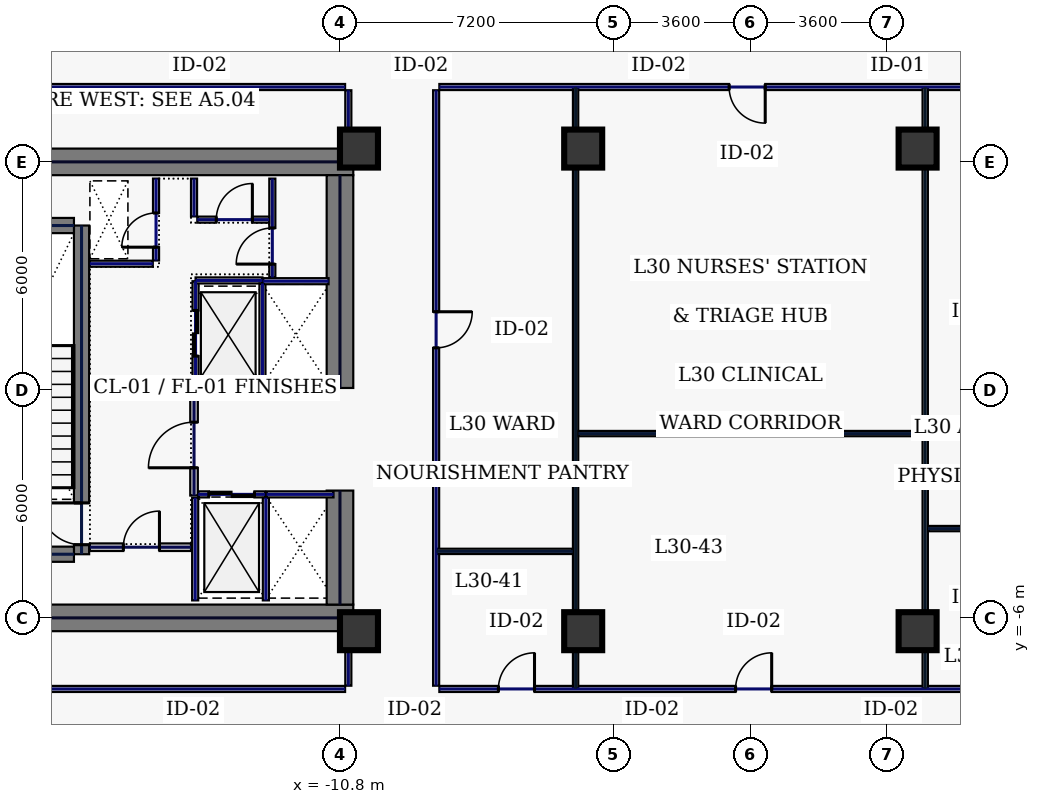
"""IFC4 building model, lengths in metres.
Left out: names, types, materials, properties, quantities, classifications, styles, units other than length and angle.
Written with IfcOpenShell. Run it as: python <this file> out.ifc"""

import sys

from ifc_helpers import new_model, si_unit, direction, frame, frame_2d, origin, origin_2d, place, context, subcontext, project, spatial, rectangle, hollow_rectangle, extrude, element, fill, save


model = new_model("IFC4")
c1 = context("Model", 3, precision=1e-05, world=origin(), true_north=direction((0.0, 1.0)))
c2 = subcontext(c1, "Body", "Model", "MODEL_VIEW")
j1 = project(units=[si_unit("LENGTHUNIT", "METRE"), si_unit("PLANEANGLEUNIT", "RADIAN")], contexts=[c1])
p1 = place(None, origin())
s1 = spatial("IfcSite", under=j1, at=p1, CompositionType="ELEMENT")
p2 = place(p1, origin())
s2 = spatial("IfcBuilding", under=s1, at=p2, CompositionType="ELEMENT")
p3 = place(p2, frame((0.0, 0.0, 133.4)))
s3 = spatial("IfcBuildingStorey", under=s2, at=p3, CompositionType="ELEMENT", Elevation=133.4)
for number, where, z_axis, x_axis in (
    (1, (-22.0, 6.0, 0.0), (0.0, 0.0, 1.0), (1.0, 0.0, 0.0)),
    (2, (-22.0, -6.0, 0.0), (0.0, 0.0, 1.0), (1.0, 0.0, 0.0)),
):
    element("IfcWall", number, at=place(p3, frame(where, z_axis=z_axis, x_axis=x_axis)), inside=s3, PredefinedType="SHEAR", context=c2, shape_type="SweptSolid", body=[
        extrude(rectangle(XDim=11.55, YDim=0.7, at=frame_2d((5.775, 0.0))), origin(), (0.0, 0.0, 1.0), 3.74),
    ])
p4 = place(p3, frame((-10.8, -5.65, 0.0), z_axis=(0.0, 0.0, 1.0), x_axis=(0.0, 1.0, 0.0)))
e3 = element("IfcWall", 3, at=p4, inside=s3, PredefinedType="SHEAR", context=c2, shape_type="SweptSolid", body=[
    extrude(rectangle(XDim=3.0, YDim=0.7, at=frame_2d((1.5, 0.0))), origin(), (0.0, 0.0, 1.0), 3.74),
])
p5 = place(p3, frame((-10.8, 0.05, 0.0), z_axis=(0.0, 0.0, 1.0), x_axis=(0.0, 1.0, 0.0)))
e4 = element("IfcWall", 4, at=p5, inside=s3, PredefinedType="SHEAR", context=c2, shape_type="SweptSolid", body=[
    extrude(rectangle(XDim=5.6, YDim=0.7, at=frame_2d((2.8, 0.0))), origin(), (0.0, 0.0, 1.0), 3.74),
])
p6 = place(p3, frame((-17.6, -4.325, 0.0), z_axis=(0.0, 0.0, 1.0), x_axis=(0.0, 1.0, 0.0)))
e5 = element("IfcWall", 5, at=p6, inside=s3, PredefinedType="SHEAR", context=c2, shape_type="SweptSolid", body=[
    extrude(rectangle(XDim=8.65, YDim=0.4, at=frame_2d((4.325, 0.0))), origin(), (0.0, 0.0, 1.0), 3.74),
])
p7 = place(p6, frame((0.25, 0.0, 0.0)))
e6 = element("IfcOpeningElement", 6, at=p7, cuts=e5, PredefinedType="OPENING", context=c2, shape_type="SweptSolid", body=[
    extrude(rectangle(XDim=1.1, YDim=2.2, at=frame_2d((0.55, 1.1))), frame((0.0, 0.21, 0.0), z_axis=(0.0, -1.0, 0.0), x_axis=(1.0, 0.0, 0.0)), (0.0, 0.0, 1.0), 0.42),
])
for number, where, z_axis, x_axis in (
    (7, (-21.2, -4.325, 0.0), (0.0, 0.0, 1.0), (1.0, 0.0, 0.0)),
    (8, (-21.2, 4.325, 0.0), (0.0, 0.0, 1.0), (1.0, 0.0, 0.0)),
):
    element("IfcWall", number, at=place(p3, frame(where, z_axis=z_axis, x_axis=x_axis)), inside=s3, PredefinedType="SHEAR", context=c2, shape_type="SweptSolid", body=[
        extrude(rectangle(XDim=3.4, YDim=0.4, at=frame_2d((1.7, 0.0))), origin(), (0.0, 0.0, 1.0), 3.74),
    ])
for number, where, z_axis, x_axis in (
    (9, (-10.3, -6.35, 0.0), (0.0, 0.0, 1.0), (1.0, 0.0, 0.0)),
    (10, (-10.3, 6.35, 0.0), (0.0, 0.0, 1.0), (1.0, 0.0, 0.0)),
    (11, (-4.4, -6.35, 0.0), (0.0, 0.0, 1.0), (1.0, 0.0, 0.0)),
    (12, (4.4, -6.35, 0.0), (0.0, 0.0, 1.0), (1.0, 0.0, 0.0)),
    (13, (-4.4, 6.35, 0.0), (0.0, 0.0, 1.0), (1.0, 0.0, 0.0)),
    (14, (4.4, 6.35, 0.0), (0.0, 0.0, 1.0), (1.0, 0.0, 0.0)),
):
    element("IfcColumn", number, at=place(p3, frame(where, z_axis=z_axis, x_axis=x_axis)), inside=s3, PredefinedType="COLUMN", context=c2, shape_type="SweptSolid", body=[
        extrude(hollow_rectangle(XDim=1.0, YDim=1.0, WallThickness=0.045, at=origin_2d()), origin(), (0.0, 0.0, 1.0), 3.74),
    ])
p8 = place(p3, frame((-14.6, 0.12, 0.0), z_axis=(0.0, 0.0, 1.0), x_axis=(0.0, 1.0, 0.0)))
e15 = element("IfcWall", 15, at=p8, inside=s3, PredefinedType="PARTITIONING", context=c2, shape_type="SweptSolid", body=[
    extrude(rectangle(XDim=2.74, YDim=0.16, at=frame_2d((1.37, 0.0))), origin(), (0.0, 0.0, 1.0), 3.74),
])
p9 = place(p8, frame((0.77, 0.0, 0.0)))
e16 = element("IfcOpeningElement", 16, at=p9, cuts=e15, PredefinedType="OPENING", context=c2, shape_type="SweptSolid", body=[
    extrude(rectangle(XDim=1.2, YDim=2.2, at=frame_2d((0.6, 1.1))), frame((0.0, 0.09, 0.0), z_axis=(0.0, -1.0, 0.0), x_axis=(1.0, 0.0, 0.0)), (0.0, 0.0, 1.0), 0.18),
])
for number, where, z_axis, x_axis in (
    (17, (-14.6, 0.1, 0.0), (0.0, 0.0, 1.0), (1.0, 0.0, 0.0)),
    (18, (-14.6, 2.88, 0.0), (0.0, 0.0, 1.0), (1.0, 0.0, 0.0)),
):
    element("IfcWall", number, at=place(p3, frame(where, z_axis=z_axis, x_axis=x_axis)), inside=s3, PredefinedType="PARTITIONING", context=c2, shape_type="SweptSolid", body=[
        extrude(rectangle(XDim=1.76, YDim=0.16, at=frame_2d((0.88, 0.0))), origin(), (0.0, 0.0, 1.0), 3.74),
    ])
p10 = place(p3, frame((-12.84, 0.18, 0.0), z_axis=(0.0, 0.0, 1.0), x_axis=(0.0, 1.0, 0.0)))
e19 = element("IfcWall", 19, at=p10, inside=s3, PredefinedType="PARTITIONING", context=c2, shape_type="SweptSolid", body=[
    extrude(rectangle(XDim=2.62, YDim=0.16, at=frame_2d((1.31, 0.0))), origin(), (0.0, 0.0, 1.0), 3.74),
])
p11 = place(p3, frame((-14.53, -2.75, 0.0), z_axis=(0.0, 0.0, 1.0), x_axis=(1.0, 0.0, 0.0)))
e20 = element("IfcWall", 20, at=p11, inside=s3, PredefinedType="PARTITIONING", context=c2, shape_type="SweptSolid", body=[
    extrude(rectangle(XDim=1.76, YDim=0.16, at=frame_2d((0.88, 0.0))), origin(), (0.0, 0.0, 1.0), 3.74),
])
p12 = place(p11, frame((0.28, 0.0, 0.0)))
e21 = element("IfcOpeningElement", 21, at=p12, cuts=e20, PredefinedType="OPENING", context=c2, shape_type="SweptSolid", body=[
    extrude(rectangle(XDim=1.2, YDim=2.2, at=frame_2d((0.6, 1.1))), frame((0.0, 0.09, 0.0), z_axis=(0.0, -1.0, 0.0), x_axis=(1.0, 0.0, 0.0)), (0.0, 0.0, 1.0), 0.18),
])
for number, where, z_axis, x_axis in (
    (22, (-12.75, -5.54, 0.0), (0.0, 0.0, 1.0), (0.0, 1.0, 0.0)),
    (23, (-14.61, -5.54, 0.0), (0.0, 0.0, 1.0), (0.0, 1.0, 0.0)),
):
    element("IfcWall", number, at=place(p3, frame(where, z_axis=z_axis, x_axis=x_axis)), inside=s3, PredefinedType="PARTITIONING", context=c2, shape_type="SweptSolid", body=[
        extrude(rectangle(XDim=2.7, YDim=0.16, at=frame_2d((1.35, 0.0))), origin(), (0.0, 0.0, 1.0), 3.74),
    ])
p13 = place(p3, frame((-12.73, -2.75, 0.0), z_axis=(0.0, 0.0, 1.0), x_axis=(1.0, 0.0, 0.0)))
e24 = element("IfcWall", 24, at=p13, inside=s3, PredefinedType="PARTITIONING", context=c2, shape_type="SweptSolid", body=[
    extrude(rectangle(XDim=1.76, YDim=0.16, at=frame_2d((0.88, 0.0))), origin(), (0.0, 0.0, 1.0), 3.74),
])
for number, where, z_axis, x_axis in (
    (25, (-12.82, 0.06, 0.0), (0.0, 0.0, 1.0), (1.0, 0.0, 0.0)),
    (26, (-12.82, 2.86, 0.0), (0.0, 0.0, 1.0), (1.0, 0.0, 0.0)),
):
    element("IfcWall", number, at=place(p3, frame(where, z_axis=z_axis, x_axis=x_axis)), inside=s3, PredefinedType="PARTITIONING", context=c2, shape_type="SweptSolid", body=[
        extrude(rectangle(XDim=1.72, YDim=0.16, at=frame_2d((0.86, 0.0))), origin(), (0.0, 0.0, 1.0), 3.74),
    ])
p14 = place(p3, frame((-15.64, 3.405, 0.0), z_axis=(0.0, 0.0, 1.0), x_axis=(0.0, 1.0, 0.0)))
e27 = element("IfcWall", 27, at=p14, inside=s3, PredefinedType="PARTITIONING", context=c2, shape_type="SweptSolid", body=[
    extrude(rectangle(XDim=2.155, YDim=0.16, at=frame_2d((1.078, 0.0))), origin(), (0.0, 0.0, 1.0), 3.74),
])
p15 = place(p14, frame((0.35, 0.0, 0.0)))
e28 = element("IfcOpeningElement", 28, at=p15, cuts=e27, PredefinedType="OPENING", context=c2, shape_type="SweptSolid", body=[
    extrude(rectangle(XDim=0.9, YDim=2.2, at=frame_2d((0.45, 1.1))), frame((0.0, 0.09, 0.0), z_axis=(0.0, -1.0, 0.0), x_axis=(1.0, 0.0, 0.0)), (0.0, 0.0, 1.0), 0.18),
])
p16 = place(p3, frame((-17.38, 3.32, 0.0), z_axis=(0.0, 0.0, 1.0), x_axis=(1.0, 0.0, 0.0)))
e29 = element("IfcWall", 29, at=p16, inside=s3, PredefinedType="PARTITIONING", context=c2, shape_type="SweptSolid", body=[
    extrude(rectangle(XDim=1.655, YDim=0.16, at=frame_2d((0.827, 0.0))), origin(), (0.0, 0.0, 1.0), 3.74),
])
p17 = place(p3, frame((-17.38, -4.14, 0.0), z_axis=(0.0, 0.0, 1.0), x_axis=(1.0, 0.0, 0.0)))
e30 = element("IfcWall", 30, at=p17, inside=s3, PredefinedType="SOLIDWALL", context=c2, shape_type="SweptSolid", body=[
    extrude(rectangle(XDim=2.66, YDim=0.2, at=frame_2d((1.33, 0.0))), origin(), (0.0, 0.0, 1.0), 3.74),
])
p18 = place(p17, frame((0.88, 0.0, 0.0)))
e31 = element("IfcOpeningElement", 31, at=p18, cuts=e30, PredefinedType="OPENING", context=c2, shape_type="SweptSolid", body=[
    extrude(rectangle(XDim=0.95, YDim=2.2, at=frame_2d((0.475, 1.1))), frame((0.0, 0.11, 0.0), z_axis=(0.0, -1.0, 0.0), x_axis=(1.0, 0.0, 0.0)), (0.0, 0.0, 1.0), 0.22),
])
p19 = place(p3, frame((-12.58, 2.96, 0.0), z_axis=(0.0, 0.0, 1.0), x_axis=(0.0, 1.0, 0.0)))
e32 = element("IfcWall", 32, at=p19, inside=s3, PredefinedType="PARTITIONING", context=c2, shape_type="SweptSolid", body=[
    extrude(rectangle(XDim=2.6, YDim=0.16, at=frame_2d((1.3, 0.0))), origin(), (0.0, 0.0, 1.0), 3.74),
])
p20 = place(p19, frame((0.35, 0.0, 0.0)))
e33 = element("IfcOpeningElement", 33, at=p20, cuts=e32, PredefinedType="OPENING", context=c2, shape_type="SweptSolid", body=[
    extrude(rectangle(XDim=0.95, YDim=2.2, at=frame_2d((0.475, 1.1))), frame((0.0, 0.09, 0.0), z_axis=(0.0, -1.0, 0.0), x_axis=(1.0, 0.0, 0.0)), (0.0, 0.0, 1.0), 0.18),
])
p21 = place(p3, frame((-14.555, 4.48, 0.0), z_axis=(0.0, 0.0, 1.0), x_axis=(1.0, 0.0, 0.0)))
e34 = element("IfcWall", 34, at=p21, inside=s3, PredefinedType="PARTITIONING", context=c2, shape_type="SweptSolid", body=[
    extrude(rectangle(XDim=1.89, YDim=0.16, at=frame_2d((0.945, 0.0))), origin(), (0.0, 0.0, 1.0), 3.74),
])
p22 = place(p21, frame((0.5, 0.0, 0.0)))
e35 = element("IfcOpeningElement", 35, at=p22, cuts=e34, PredefinedType="OPENING", context=c2, shape_type="SweptSolid", body=[
    extrude(rectangle(XDim=0.95, YDim=2.2, at=frame_2d((0.475, 1.1))), frame((0.0, 0.09, 0.0), z_axis=(0.0, -1.0, 0.0), x_axis=(1.0, 0.0, 0.0)), (0.0, 0.0, 1.0), 0.18),
])
p23 = place(p3, frame((-14.64, 4.565, 0.0), z_axis=(0.0, 0.0, 1.0), x_axis=(0.0, 1.0, 0.0)))
e36 = element("IfcWall", 36, at=p23, inside=s3, PredefinedType="PARTITIONING", context=c2, shape_type="SweptSolid", body=[
    extrude(rectangle(XDim=0.995, YDim=0.16, at=frame_2d((0.498, 0.0))), origin(), (0.0, 0.0, 1.0), 3.74),
])
p24 = place(p3, frame((-14.64, -2.78, 0.0), z_axis=(0.0, 0.0, 1.0), x_axis=(0.0, 1.0, 0.0)))
e37 = element("IfcWall", 37, at=p24, inside=s3, PredefinedType="SOLIDWALL", context=c2, shape_type="SweptSolid", body=[
    extrude(rectangle(XDim=2.82, YDim=0.2, at=frame_2d((1.41, 0.0))), origin(), (0.0, 0.0, 1.0), 3.74),
])
p25 = place(p24, frame((0.73, 0.0, 0.0)))
e38 = element("IfcOpeningElement", 38, at=p25, cuts=e37, PredefinedType="OPENING", context=c2, shape_type="SweptSolid", body=[
    extrude(rectangle(XDim=1.2, YDim=2.2, at=frame_2d((0.6, 1.1))), frame((0.0, 0.11, 0.0), z_axis=(0.0, -1.0, 0.0), x_axis=(1.0, 0.0, 0.0)), (0.0, 0.0, 1.0), 0.22),
])
p26 = place(p3, frame((8.185, 7.97, 0.0), z_axis=(0.0, 0.0, 1.0), x_axis=(-1.0, 0.0, 0.0)))
e39 = element("IfcWall", 39, at=p26, inside=s3, PredefinedType="PARTITIONING", context=c2, shape_type="SweptSolid", body=[
    extrude(rectangle(XDim=16.37, YDim=0.16, at=frame_2d((8.185, 0.0))), origin(), (0.0, 0.0, 1.0), 3.74),
])
p27 = place(p26, frame((7.795, 0.0, 0.0)))
e40 = element("IfcOpeningElement", 40, at=p27, cuts=e39, PredefinedType="OPENING", context=c2, shape_type="SweptSolid", body=[
    extrude(rectangle(XDim=0.95, YDim=2.2, at=frame_2d((0.475, 1.1))), frame((0.0, 0.09, 0.0), z_axis=(0.0, -1.0, 0.0), x_axis=(1.0, 0.0, 0.0)), (0.0, 0.0, 1.0), 0.18),
])
p28 = place(p3, frame((-8.27, 7.885, 0.0), z_axis=(0.0, 0.0, 1.0), x_axis=(0.0, -1.0, 0.0)))
e41 = element("IfcWall", 41, at=p28, inside=s3, PredefinedType="PARTITIONING", context=c2, shape_type="SweptSolid", body=[
    extrude(rectangle(XDim=15.67, YDim=0.16, at=frame_2d((7.835, 0.0))), origin(), (0.0, 0.0, 1.0), 3.74),
])
p29 = place(p28, frame((5.829, 0.0, 0.0)))
e42 = element("IfcOpeningElement", 42, at=p29, cuts=e41, PredefinedType="OPENING", context=c2, shape_type="SweptSolid", body=[
    extrude(rectangle(XDim=0.95, YDim=2.2, at=frame_2d((0.475, 1.1))), frame((0.0, 0.09, 0.0), z_axis=(0.0, -1.0, 0.0), x_axis=(1.0, 0.0, 0.0)), (0.0, 0.0, 1.0), 0.18),
])
p30 = place(p3, frame((-8.185, -7.87, 0.0), z_axis=(0.0, 0.0, 1.0), x_axis=(1.0, 0.0, 0.0)))
e43 = element("IfcWall", 43, at=p30, inside=s3, PredefinedType="PARTITIONING", context=c2, shape_type="SweptSolid", body=[
    extrude(rectangle(XDim=16.37, YDim=0.16, at=frame_2d((8.185, 0.0))), origin(), (0.0, 0.0, 1.0), 3.74),
])
p31 = place(p30, frame((1.554, 0.0, 0.0)))
e44 = element("IfcOpeningElement", 44, at=p31, cuts=e43, PredefinedType="OPENING", context=c2, shape_type="SweptSolid", body=[
    extrude(rectangle(XDim=0.95, YDim=2.2, at=frame_2d((0.475, 1.1))), frame((0.0, 0.09, 0.0), z_axis=(0.0, -1.0, 0.0), x_axis=(1.0, 0.0, 0.0)), (0.0, 0.0, 1.0), 0.18),
])
p32 = place(p30, frame((7.795, 0.0, 0.0)))
e45 = element("IfcOpeningElement", 45, at=p32, cuts=e43, PredefinedType="OPENING", context=c2, shape_type="SweptSolid", body=[
    extrude(rectangle(XDim=0.95, YDim=2.2, at=frame_2d((0.475, 1.1))), frame((0.0, 0.09, 0.0), z_axis=(0.0, -1.0, 0.0), x_axis=(1.0, 0.0, 0.0)), (0.0, 0.0, 1.0), 0.18),
])
p33 = place(p3, frame((-10.58, -7.785, 0.0), z_axis=(0.0, 0.0, 1.0), x_axis=(0.0, 1.0, 0.0)))
e46 = element("IfcWall", 46, at=p33, inside=s3, PredefinedType="PARTITIONING", context=c2, shape_type="SweptSolid", body=[
    extrude(rectangle(XDim=1.365, YDim=0.16, at=frame_2d((0.683, 0.0))), origin(), (0.0, 0.0, 1.0), 3.74),
])
p34 = place(p3, frame((-10.58, 6.42, 0.0), z_axis=(0.0, 0.0, 1.0), x_axis=(0.0, 1.0, 0.0)))
e47 = element("IfcWall", 47, at=p34, inside=s3, PredefinedType="PARTITIONING", context=c2, shape_type="SweptSolid", body=[
    extrude(rectangle(XDim=1.465, YDim=0.16, at=frame_2d((0.732, 0.0))), origin(), (0.0, 0.0, 1.0), 3.74),
])
for number, where, z_axis, x_axis in (
    (48, (-10.665, 7.97, 0.0), (0.0, 0.0, 1.0), (-1.0, 0.0, 0.0)),
    (49, (-25.235, -7.87, 0.0), (0.0, 0.0, 1.0), (1.0, 0.0, 0.0)),
):
    element("IfcWall", number, at=place(p3, frame(where, z_axis=z_axis, x_axis=x_axis)), inside=s3, PredefinedType="PARTITIONING", context=c2, shape_type="SweptSolid", body=[
        extrude(rectangle(XDim=14.57, YDim=0.16, at=frame_2d((7.285, 0.0))), origin(), (0.0, 0.0, 1.0), 3.74),
    ])
for number, where, z_axis, x_axis in (
    (50, (-4.6, -7.865, 0.0), (0.0, 0.0, 1.0), (0.0, 1.0, 0.0)),
    (51, (4.6, -7.865, 0.0), (0.0, 0.0, 1.0), (0.0, 1.0, 0.0)),
):
    element("IfcWall", number, at=place(p3, frame(where, z_axis=z_axis, x_axis=x_axis)), inside=s3, PredefinedType="PARTITIONING", context=c2, shape_type="SweptSolid", body=[
        extrude(rectangle(XDim=15.83, YDim=0.14, at=frame_2d((7.915, 0.0))), origin(), (0.0, 0.0, 1.0), 2.935),
    ])
p35 = place(p3, frame((-4.525, -1.15, 0.0), z_axis=(0.0, 0.0, 1.0), x_axis=(1.0, 0.0, 0.0)))
e52 = element("IfcWall", 52, at=p35, inside=s3, PredefinedType="PARTITIONING", context=c2, shape_type="SweptSolid", body=[
    extrude(rectangle(XDim=9.05, YDim=0.14, at=frame_2d((4.525, 0.0))), origin(), (0.0, 0.0, 1.0), 3.74),
])
for number, where, z_axis, x_axis in (
    (53, (-8.265, -4.25, 0.0), (0.0, 0.0, 1.0), (1.0, 0.0, 0.0)),
    (54, (4.675, -3.65, 0.0), (0.0, 0.0, 1.0), (1.0, 0.0, 0.0)),
):
    element("IfcWall", number, at=place(p3, frame(where, z_axis=z_axis, x_axis=x_axis)), inside=s3, PredefinedType="PARTITIONING", context=c2, shape_type="SweptSolid", body=[
        extrude(rectangle(XDim=3.59, YDim=0.14, at=frame_2d((1.795, 0.0))), origin(), (0.0, 0.0, 1.0), 3.74),
    ])
p36 = place(p7, origin())
e55 = element("IfcDoor", 55, at=p36, inside=s3, OperationType="SINGLE_SWING_RIGHT", PredefinedType="DOOR", context=c2, shape_type="SweptSolid", body=[
    extrude(rectangle(XDim=1.1, YDim=2.2, at=frame_2d((0.55, 1.1))), frame((0.0, 0.025, 0.0), z_axis=(0.0, -1.0, 0.0), x_axis=(1.0, 0.0, 0.0)), (0.0, 0.0, 1.0), 0.05),
])
fill(e6, e55)
p37 = place(p9, origin())
e56 = element("IfcDoor", 56, at=p37, inside=s3, OperationType="SLIDING_TO_LEFT", PredefinedType="DOOR", context=c2, shape_type="SweptSolid", body=[
    extrude(rectangle(XDim=1.2, YDim=2.2, at=frame_2d((0.6, 1.1))), frame((0.0, 0.025, 0.0), z_axis=(0.0, -1.0, 0.0), x_axis=(1.0, 0.0, 0.0)), (0.0, 0.0, 1.0), 0.05),
])
fill(e16, e56)
p38 = place(p12, origin())
e57 = element("IfcDoor", 57, at=p38, inside=s3, OperationType="SLIDING_TO_LEFT", PredefinedType="DOOR", context=c2, shape_type="SweptSolid", body=[
    extrude(rectangle(XDim=1.2, YDim=2.2, at=frame_2d((0.6, 1.1))), frame((0.0, 0.025, 0.0), z_axis=(0.0, -1.0, 0.0), x_axis=(1.0, 0.0, 0.0)), (0.0, 0.0, 1.0), 0.05),
])
fill(e21, e57)
p39 = place(p15, origin())
e58 = element("IfcDoor", 58, at=p39, inside=s3, OperationType="SINGLE_SWING_LEFT", PredefinedType="DOOR", context=c2, shape_type="SweptSolid", body=[
    extrude(rectangle(XDim=0.9, YDim=2.2, at=frame_2d((0.45, 1.1))), frame((0.0, 0.025, 0.0), z_axis=(0.0, -1.0, 0.0), x_axis=(1.0, 0.0, 0.0)), (0.0, 0.0, 1.0), 0.05),
])
fill(e28, e58)
p40 = place(p18, origin())
e59 = element("IfcDoor", 59, at=p40, inside=s3, OperationType="SINGLE_SWING_RIGHT", PredefinedType="DOOR", context=c2, shape_type="SweptSolid", body=[
    extrude(rectangle(XDim=0.95, YDim=2.2, at=frame_2d((0.475, 1.1))), frame((0.0, 0.025, 0.0), z_axis=(0.0, -1.0, 0.0), x_axis=(1.0, 0.0, 0.0)), (0.0, 0.0, 1.0), 0.05),
])
fill(e31, e59)
p41 = place(p20, origin())
e60 = element("IfcDoor", 60, at=p41, inside=s3, OperationType="SINGLE_SWING_LEFT", PredefinedType="DOOR", context=c2, shape_type="SweptSolid", body=[
    extrude(rectangle(XDim=0.95, YDim=2.2, at=frame_2d((0.475, 1.1))), frame((0.0, 0.025, 0.0), z_axis=(0.0, -1.0, 0.0), x_axis=(1.0, 0.0, 0.0)), (0.0, 0.0, 1.0), 0.05),
])
fill(e33, e60)
p42 = place(p22, origin())
e61 = element("IfcDoor", 61, at=p42, inside=s3, OperationType="SINGLE_SWING_RIGHT", PredefinedType="DOOR", context=c2, shape_type="SweptSolid", body=[
    extrude(rectangle(XDim=0.95, YDim=2.2, at=frame_2d((0.475, 1.1))), frame((0.0, 0.025, 0.0), z_axis=(0.0, -1.0, 0.0), x_axis=(1.0, 0.0, 0.0)), (0.0, 0.0, 1.0), 0.05),
])
fill(e35, e61)
p43 = place(p25, origin())
e62 = element("IfcDoor", 62, at=p43, inside=s3, OperationType="SINGLE_SWING_LEFT", PredefinedType="DOOR", context=c2, shape_type="SweptSolid", body=[
    extrude(rectangle(XDim=1.2, YDim=2.2, at=frame_2d((0.6, 1.1))), frame((0.0, 0.025, 0.0), z_axis=(0.0, -1.0, 0.0), x_axis=(1.0, 0.0, 0.0)), (0.0, 0.0, 1.0), 0.05),
])
fill(e38, e62)
p44 = place(p31, origin())
e63 = element("IfcDoor", 63, at=p44, inside=s3, OperationType="SINGLE_SWING_RIGHT", PredefinedType="DOOR", context=c2, shape_type="SweptSolid", body=[
    extrude(rectangle(XDim=0.95, YDim=2.2, at=frame_2d((0.475, 1.1))), frame((0.0, 0.025, 0.0), z_axis=(0.0, -1.0, 0.0), x_axis=(1.0, 0.0, 0.0)), (0.0, 0.0, 1.0), 0.05),
])
fill(e44, e63)
p45 = place(p29, origin())
e64 = element("IfcDoor", 64, at=p45, inside=s3, OperationType="SINGLE_SWING_LEFT", PredefinedType="DOOR", context=c2, shape_type="SweptSolid", body=[
    extrude(rectangle(XDim=0.95, YDim=2.2, at=frame_2d((0.475, 1.1))), frame((0.0, 0.025, 0.0), z_axis=(0.0, -1.0, 0.0), x_axis=(1.0, 0.0, 0.0)), (0.0, 0.0, 1.0), 0.05),
])
fill(e42, e64)
p46 = place(p32, origin())
e65 = element("IfcDoor", 65, at=p46, inside=s3, OperationType="SINGLE_SWING_RIGHT", PredefinedType="DOOR", context=c2, shape_type="SweptSolid", body=[
    extrude(rectangle(XDim=0.95, YDim=2.2, at=frame_2d((0.475, 1.1))), frame((0.0, 0.025, 0.0), z_axis=(0.0, -1.0, 0.0), x_axis=(1.0, 0.0, 0.0)), (0.0, 0.0, 1.0), 0.05),
])
fill(e45, e65)
p47 = place(p27, origin())
e66 = element("IfcDoor", 66, at=p47, inside=s3, OperationType="SINGLE_SWING_LEFT", PredefinedType="DOOR", context=c2, shape_type="SweptSolid", body=[
    extrude(rectangle(XDim=0.95, YDim=2.2, at=frame_2d((0.475, 1.1))), frame((0.0, 0.025, 0.0), z_axis=(0.0, -1.0, 0.0), x_axis=(1.0, 0.0, 0.0)), (0.0, 0.0, 1.0), 0.05),
])
fill(e40, e66)
save(model, sys.argv[1])
